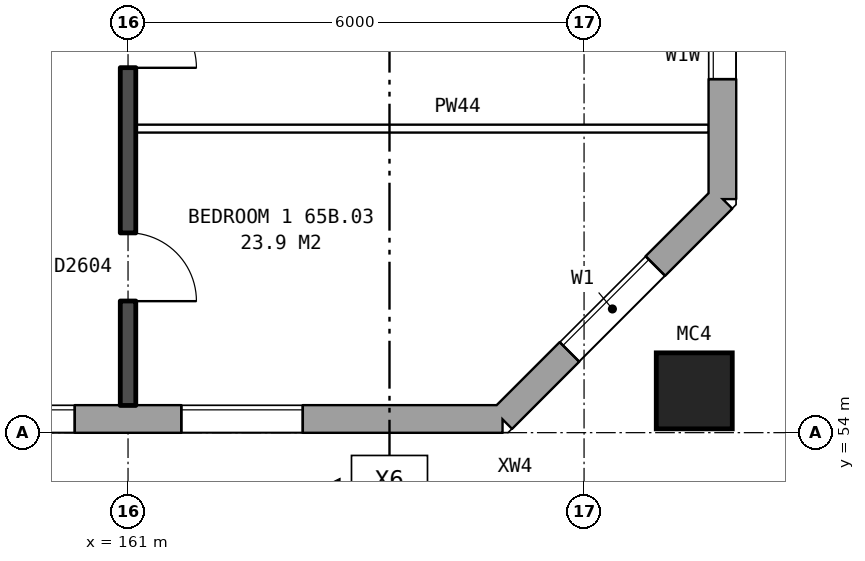
"""IFC4 building model, lengths in metres.
Left out: names, types, materials, properties, quantities, classifications, styles, units other than length and angle.
Written with IfcOpenShell. Run it as: python <this file> out.ifc"""

import sys

from ifc_helpers import new_model, si_unit, direction, frame, frame_2d, origin, origin_2d, place, context, subcontext, project, spatial, rectangle, hollow_rectangle, extrude, element, fill, save


model = new_model("IFC4")
c1 = context("Model", 3, precision=1e-05, world=origin(), true_north=direction((0.0, 1.0)))
c2 = subcontext(c1, "Body", "Model", "MODEL_VIEW")
j1 = project(units=[si_unit("LENGTHUNIT", "METRE"), si_unit("PLANEANGLEUNIT", "RADIAN")], contexts=[c1])
p1 = place(None, origin())
s1 = spatial("IfcSite", under=j1, at=p1, CompositionType="ELEMENT")
p2 = place(p1, origin())
s2 = spatial("IfcBuilding", under=s1, at=p2, CompositionType="ELEMENT")
p3 = place(p2, frame((0.0, 0.0, 230.7)))
s3 = spatial("IfcBuildingStorey", under=s2, at=p3, CompositionType="ELEMENT", Elevation=230.7)
p4 = place(p3, frame((168.45, 54.55, 0.0), z_axis=(0.0, 0.0, 1.0), x_axis=(1.0, 0.0, 0.0)))
e1 = element("IfcColumn", 1, at=p4, inside=s3, PredefinedType="COLUMN", context=c2, shape_type="SweptSolid", body=[
    extrude(hollow_rectangle(XDim=1.0, YDim=1.0, WallThickness=0.055, at=origin_2d()), origin(), (0.0, 0.0, 1.0), 3.1),
])
p5 = place(p3, frame((132.05, 54.18, 0.0), z_axis=(0.0, 0.0, 1.0), x_axis=(1.0, 0.0, 0.0)))
e2 = element("IfcWall", 2, at=p5, inside=s3, PredefinedType="STANDARD", context=c2, shape_type="SweptSolid", body=[
    extrude(rectangle(XDim=33.875, YDim=0.36, at=frame_2d((16.938, 0.0))), origin(), (0.0, 0.0, 1.0), 2.85),
])
p6 = place(p5, frame((2.65, 0.0, 0.8)))
e3 = element("IfcOpeningElement", 3, at=p6, cuts=e2, PredefinedType="OPENING", context=c2, shape_type="SweptSolid", body=[
    extrude(rectangle(XDim=1.6, YDim=1.8, at=frame_2d((0.8, 0.9))), frame((0.0, 0.19, 0.0), z_axis=(0.0, -1.0, 0.0), x_axis=(1.0, 0.0, 0.0)), (0.0, 0.0, 1.0), 0.38),
])
p7 = place(p5, frame((5.65, 0.0, 0.8)))
e4 = element("IfcOpeningElement", 4, at=p7, cuts=e2, PredefinedType="OPENING", context=c2, shape_type="SweptSolid", body=[
    extrude(rectangle(XDim=1.6, YDim=1.8, at=frame_2d((0.8, 0.9))), frame((0.0, 0.19, 0.0), z_axis=(0.0, -1.0, 0.0), x_axis=(1.0, 0.0, 0.0)), (0.0, 0.0, 1.0), 0.38),
])
p8 = place(p5, frame((8.65, 0.0, 0.8)))
e5 = element("IfcOpeningElement", 5, at=p8, cuts=e2, PredefinedType="OPENING", context=c2, shape_type="SweptSolid", body=[
    extrude(rectangle(XDim=1.6, YDim=1.8, at=frame_2d((0.8, 0.9))), frame((0.0, 0.19, 0.0), z_axis=(0.0, -1.0, 0.0), x_axis=(1.0, 0.0, 0.0)), (0.0, 0.0, 1.0), 0.38),
])
p9 = place(p5, frame((11.65, 0.0, 0.8)))
e6 = element("IfcOpeningElement", 6, at=p9, cuts=e2, PredefinedType="OPENING", context=c2, shape_type="SweptSolid", body=[
    extrude(rectangle(XDim=1.6, YDim=1.8, at=frame_2d((0.8, 0.9))), frame((0.0, 0.19, 0.0), z_axis=(0.0, -1.0, 0.0), x_axis=(1.0, 0.0, 0.0)), (0.0, 0.0, 1.0), 0.38),
])
p10 = place(p5, frame((14.1, 0.0, 1.25)))
e7 = element("IfcOpeningElement", 7, at=p10, cuts=e2, PredefinedType="OPENING", context=c2, shape_type="SweptSolid", body=[
    extrude(rectangle(XDim=0.8, YDim=1.2, at=frame_2d((0.4, 0.6))), frame((0.0, 0.19, 0.0), z_axis=(0.0, -1.0, 0.0), x_axis=(1.0, 0.0, 0.0)), (0.0, 0.0, 1.0), 0.38),
])
p11 = place(p5, frame((17.65, 0.0, 0.8)))
e8 = element("IfcOpeningElement", 8, at=p11, cuts=e2, PredefinedType="OPENING", context=c2, shape_type="SweptSolid", body=[
    extrude(rectangle(XDim=1.6, YDim=1.8, at=frame_2d((0.8, 0.9))), frame((0.0, 0.19, 0.0), z_axis=(0.0, -1.0, 0.0), x_axis=(1.0, 0.0, 0.0)), (0.0, 0.0, 1.0), 0.38),
])
p12 = place(p5, frame((21.25, 0.0, 0.8)))
e9 = element("IfcOpeningElement", 9, at=p12, cuts=e2, PredefinedType="OPENING", context=c2, shape_type="SweptSolid", body=[
    extrude(rectangle(XDim=1.4, YDim=1.8, at=frame_2d((0.7, 0.9))), frame((0.0, 0.19, 0.0), z_axis=(0.0, -1.0, 0.0), x_axis=(1.0, 0.0, 0.0)), (0.0, 0.0, 1.0), 0.38),
])
p13 = place(p5, frame((23.65, 0.0, 0.8)))
e10 = element("IfcOpeningElement", 10, at=p13, cuts=e2, PredefinedType="OPENING", context=c2, shape_type="SweptSolid", body=[
    extrude(rectangle(XDim=1.6, YDim=1.8, at=frame_2d((0.8, 0.9))), frame((0.0, 0.19, 0.0), z_axis=(0.0, -1.0, 0.0), x_axis=(1.0, 0.0, 0.0)), (0.0, 0.0, 1.0), 0.38),
])
p14 = place(p5, frame((26.65, 0.0, 0.8)))
e11 = element("IfcOpeningElement", 11, at=p14, cuts=e2, PredefinedType="OPENING", context=c2, shape_type="SweptSolid", body=[
    extrude(rectangle(XDim=1.6, YDim=1.8, at=frame_2d((0.8, 0.9))), frame((0.0, 0.19, 0.0), z_axis=(0.0, -1.0, 0.0), x_axis=(1.0, 0.0, 0.0)), (0.0, 0.0, 1.0), 0.38),
])
p15 = place(p5, frame((29.65, 0.0, 0.8)))
e12 = element("IfcOpeningElement", 12, at=p15, cuts=e2, PredefinedType="OPENING", context=c2, shape_type="SweptSolid", body=[
    extrude(rectangle(XDim=1.6, YDim=1.8, at=frame_2d((0.8, 0.9))), frame((0.0, 0.19, 0.0), z_axis=(0.0, -1.0, 0.0), x_axis=(1.0, 0.0, 0.0)), (0.0, 0.0, 1.0), 0.38),
])
p16 = place(p5, frame((16.1, 0.0, 0.15)))
e13 = element("IfcOpeningElement", 13, at=p16, cuts=e2, PredefinedType="OPENING", context=c2, shape_type="SweptSolid", body=[
    extrude(rectangle(XDim=0.6, YDim=1.2, at=frame_2d((0.3, 0.6))), frame((0.0, 0.19, 0.0), z_axis=(0.0, -1.0, 0.0), x_axis=(1.0, 0.0, 0.0)), (0.0, 0.0, 1.0), 0.38),
])
p17 = place(p3, frame((165.925, 54.18, 0.0), z_axis=(0.0, 0.0, 1.0), x_axis=(0.707106781187, 0.707106781187, 0.0)))
e14 = element("IfcWall", 14, at=p17, inside=s3, PredefinedType="STANDARD", context=c2, shape_type="SweptSolid", body=[
    extrude(rectangle(XDim=4.094, YDim=0.36, at=frame_2d((2.047, 0.0))), origin(), (0.0, 0.0, 1.0), 2.85),
])
p18 = place(p17, frame((1.247, 0.0, 0.8)))
e15 = element("IfcOpeningElement", 15, at=p18, cuts=e14, PredefinedType="OPENING", context=c2, shape_type="SweptSolid", body=[
    extrude(rectangle(XDim=1.6, YDim=1.8, at=frame_2d((0.8, 0.9))), frame((0.0, 0.19, 0.0), z_axis=(0.0, -1.0, 0.0), x_axis=(1.0, 0.0, 0.0)), (0.0, 0.0, 1.0), 0.38),
])
p19 = place(p3, frame((168.82, 57.075, 0.0), z_axis=(0.0, 0.0, 1.0), x_axis=(0.0, 1.0, 0.0)))
e16 = element("IfcWall", 16, at=p19, inside=s3, PredefinedType="STANDARD", context=c2, shape_type="SweptSolid", body=[
    extrude(rectangle(XDim=25.851, YDim=0.36, at=frame_2d((12.925, 0.0))), origin(), (0.0, 0.0, 1.0), 2.85),
])
p20 = place(p19, frame((1.575, 0.0, 1.7)))
e17 = element("IfcOpeningElement", 17, at=p20, cuts=e16, PredefinedType="OPENING", context=c2, shape_type="SweptSolid", body=[
    extrude(rectangle(XDim=0.6, YDim=0.9, at=frame_2d((0.3, 0.45))), frame((0.0, 0.19, 0.0), z_axis=(0.0, -1.0, 0.0), x_axis=(1.0, 0.0, 0.0)), (0.0, 0.0, 1.0), 0.38),
])
p21 = place(p19, frame((4.625, 0.0, 0.8)))
e18 = element("IfcOpeningElement", 18, at=p21, cuts=e16, PredefinedType="OPENING", context=c2, shape_type="SweptSolid", body=[
    extrude(rectangle(XDim=1.6, YDim=1.8, at=frame_2d((0.8, 0.9))), frame((0.0, 0.19, 0.0), z_axis=(0.0, -1.0, 0.0), x_axis=(1.0, 0.0, 0.0)), (0.0, 0.0, 1.0), 0.38),
])
p22 = place(p19, frame((19.625, 0.0, 0.8)))
e19 = element("IfcOpeningElement", 19, at=p22, cuts=e16, PredefinedType="OPENING", context=c2, shape_type="SweptSolid", body=[
    extrude(rectangle(XDim=1.6, YDim=1.8, at=frame_2d((0.8, 0.9))), frame((0.0, 0.19, 0.0), z_axis=(0.0, -1.0, 0.0), x_axis=(1.0, 0.0, 0.0)), (0.0, 0.0, 1.0), 0.38),
])
p23 = place(p19, frame((21.525, 0.0, 0.8)))
e20 = element("IfcOpeningElement", 20, at=p23, cuts=e16, PredefinedType="OPENING", context=c2, shape_type="SweptSolid", body=[
    extrude(rectangle(XDim=1.6, YDim=1.8, at=frame_2d((0.8, 0.9))), frame((0.0, 0.19, 0.0), z_axis=(0.0, -1.0, 0.0), x_axis=(1.0, 0.0, 0.0)), (0.0, 0.0, 1.0), 0.38),
])
p24 = place(p19, frame((2.475, 0.0, 0.8)))
e21 = element("IfcOpeningElement", 21, at=p24, cuts=e16, PredefinedType="OPENING", context=c2, shape_type="SweptSolid", body=[
    extrude(rectangle(XDim=1.2, YDim=1.8, at=frame_2d((0.6, 0.9))), frame((0.0, 0.19, 0.0), z_axis=(0.0, -1.0, 0.0), x_axis=(1.0, 0.0, 0.0)), (0.0, 0.0, 1.0), 0.38),
])
p25 = place(p19, frame((23.425, 0.0, 1.7)))
e22 = element("IfcOpeningElement", 22, at=p25, cuts=e16, PredefinedType="OPENING", context=c2, shape_type="SweptSolid", body=[
    extrude(rectangle(XDim=0.8, YDim=0.9, at=frame_2d((0.4, 0.45))), frame((0.0, 0.19, 0.0), z_axis=(0.0, -1.0, 0.0), x_axis=(1.0, 0.0, 0.0)), (0.0, 0.0, 1.0), 0.38),
])
p26 = place(p3, frame((161.1, 58.0, 0.0), z_axis=(0.0, 0.0, 1.0), x_axis=(1.0, 0.0, 0.0)))
e23 = element("IfcWall", 23, at=p26, inside=s3, PredefinedType="PARTITIONING", context=c2, shape_type="SweptSolid", body=[
    extrude(rectangle(XDim=7.54, YDim=0.1, at=frame_2d((3.77, 0.0))), origin(), (0.0, 0.0, 1.0), 2.85),
])
p27 = place(p3, frame((161.0, 54.36, 0.0), z_axis=(0.0, 0.0, 1.0), x_axis=(0.0, 1.0, 0.0)))
e24 = element("IfcWall", 24, at=p27, inside=s3, PredefinedType="SOLIDWALL", context=c2, shape_type="SweptSolid", body=[
    extrude(rectangle(XDim=9.44, YDim=0.2, at=frame_2d((4.72, 0.0))), origin(), (0.0, 0.0, 1.0), 2.85),
])
p28 = place(p27, frame((1.37, 0.0, 0.0)))
e25 = element("IfcOpeningElement", 25, at=p28, cuts=e24, PredefinedType="OPENING", context=c2, shape_type="SweptSolid", body=[
    extrude(rectangle(XDim=0.9, YDim=2.1, at=frame_2d((0.45, 1.05))), frame((0.0, 0.11, 0.0), z_axis=(0.0, -1.0, 0.0), x_axis=(1.0, 0.0, 0.0)), (0.0, 0.0, 1.0), 0.22),
])
p29 = place(p27, frame((4.44, 0.0, 0.0)))
e26 = element("IfcOpeningElement", 26, at=p29, cuts=e24, PredefinedType="OPENING", context=c2, shape_type="SweptSolid", body=[
    extrude(rectangle(XDim=0.9, YDim=2.1, at=frame_2d((0.45, 1.05))), frame((0.0, 0.11, 0.0), z_axis=(0.0, -1.0, 0.0), x_axis=(1.0, 0.0, 0.0)), (0.0, 0.0, 1.0), 0.22),
])
p30 = place(p27, frame((7.59, 0.0, 0.0)))
e27 = element("IfcOpeningElement", 27, at=p30, cuts=e24, PredefinedType="OPENING", context=c2, shape_type="SweptSolid", body=[
    extrude(rectangle(XDim=0.9, YDim=2.1, at=frame_2d((0.45, 1.05))), frame((0.0, 0.11, 0.0), z_axis=(0.0, -1.0, 0.0), x_axis=(1.0, 0.0, 0.0)), (0.0, 0.0, 1.0), 0.22),
])
p31 = place(p14, origin())
e28 = element("IfcWindow", 28, at=p31, inside=s3, PartitioningType="SINGLE_PANEL", PredefinedType="WINDOW", context=c2, shape_type="SweptSolid", body=[
    extrude(rectangle(XDim=1.6, YDim=1.8, at=frame_2d((0.8, 0.9))), frame((0.0, 0.15, 0.0), z_axis=(0.0, -1.0, 0.0), x_axis=(1.0, 0.0, 0.0)), (0.0, 0.0, 1.0), 0.06),
])
fill(e11, e28)
p32 = place(p15, origin())
e29 = element("IfcWindow", 29, at=p32, inside=s3, PartitioningType="SINGLE_PANEL", PredefinedType="WINDOW", context=c2, shape_type="SweptSolid", body=[
    extrude(rectangle(XDim=1.6, YDim=1.8, at=frame_2d((0.8, 0.9))), frame((0.0, 0.15, 0.0), z_axis=(0.0, -1.0, 0.0), x_axis=(1.0, 0.0, 0.0)), (0.0, 0.0, 1.0), 0.06),
])
fill(e12, e29)
p33 = place(p18, origin())
e30 = element("IfcWindow", 30, at=p33, inside=s3, PartitioningType="SINGLE_PANEL", PredefinedType="WINDOW", context=c2, shape_type="SweptSolid", body=[
    extrude(rectangle(XDim=1.6, YDim=1.8, at=frame_2d((0.8, 0.9))), frame((0.0, 0.15, 0.0), z_axis=(0.0, -1.0, 0.0), x_axis=(1.0, 0.0, 0.0)), (0.0, 0.0, 1.0), 0.06),
])
fill(e15, e30)
p34 = place(p20, origin())
e31 = element("IfcWindow", 31, at=p34, inside=s3, PartitioningType="SINGLE_PANEL", PredefinedType="WINDOW", context=c2, shape_type="SweptSolid", body=[
    extrude(rectangle(XDim=0.6, YDim=0.9, at=frame_2d((0.3, 0.45))), frame((0.0, 0.15, 0.0), z_axis=(0.0, -1.0, 0.0), x_axis=(1.0, 0.0, 0.0)), (0.0, 0.0, 1.0), 0.06),
])
fill(e17, e31)
p35 = place(p28, frame((0.9, 0.0, 0.0), z_axis=(0.0, 0.0, 1.0), x_axis=(-1.0, 0.0, 0.0)))
e32 = element("IfcDoor", 32, at=p35, inside=s3, OperationType="SINGLE_SWING_RIGHT", PredefinedType="DOOR", context=c2, shape_type="SweptSolid", body=[
    extrude(rectangle(XDim=0.9, YDim=2.1, at=frame_2d((0.45, 1.05))), frame((0.0, 0.025, 0.0), z_axis=(0.0, -1.0, 0.0), x_axis=(1.0, 0.0, 0.0)), (0.0, 0.0, 1.0), 0.05),
])
fill(e25, e32)
p36 = place(p29, frame((0.9, 0.0, 0.0), z_axis=(0.0, 0.0, 1.0), x_axis=(-1.0, 0.0, 0.0)))
e33 = element("IfcDoor", 33, at=p36, inside=s3, OperationType="SINGLE_SWING_RIGHT", PredefinedType="DOOR", context=c2, shape_type="SweptSolid", body=[
    extrude(rectangle(XDim=0.9, YDim=2.1, at=frame_2d((0.45, 1.05))), frame((0.0, 0.025, 0.0), z_axis=(0.0, -1.0, 0.0), x_axis=(1.0, 0.0, 0.0)), (0.0, 0.0, 1.0), 0.05),
])
fill(e26, e33)
save(model, sys.argv[1])
